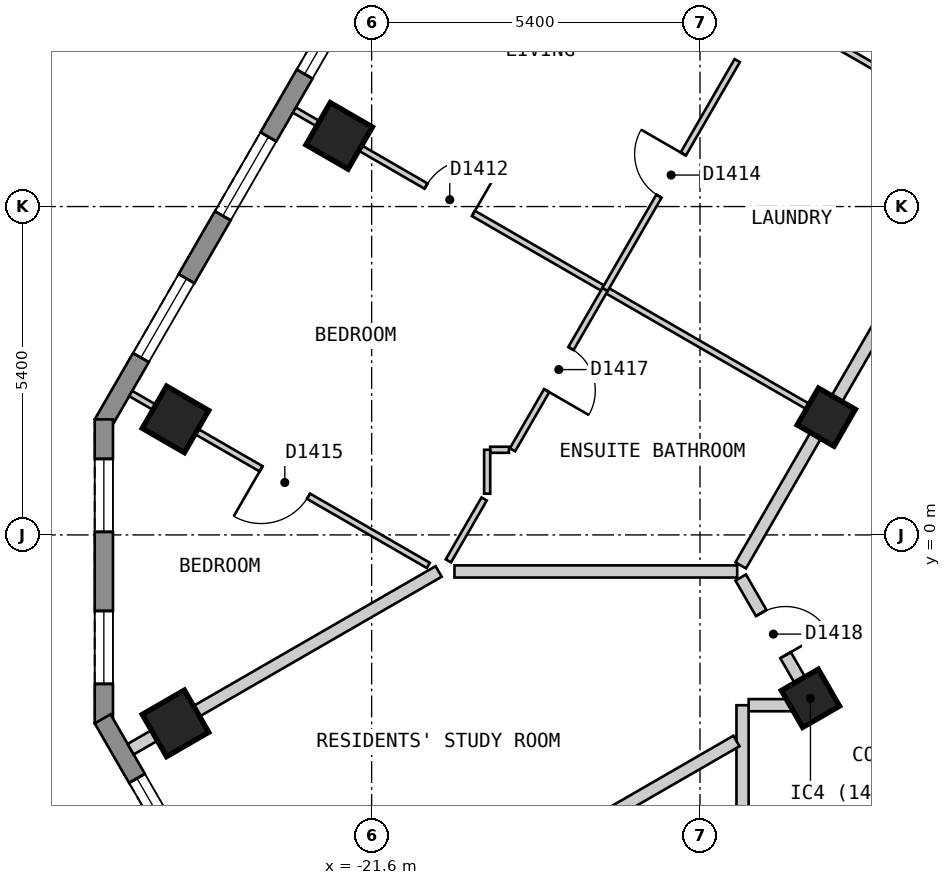
"""IFC4 building model, lengths in metres.
Left out: names, types, materials, properties, quantities, classifications, styles, units other than length and angle.
Written with IfcOpenShell. Run it as: python <this file> out.ifc"""

import sys

from ifc_helpers import new_model, si_unit, direction, frame, frame_2d, origin, origin_2d, place, context, subcontext, project, spatial, polyline, rectangle, outline, extrude, element, fill, save


model = new_model("IFC4")
c1 = context("Model", 3, precision=1e-05, world=origin(), true_north=direction((0.0, 1.0)))
c2 = subcontext(c1, "Body", "Model", "MODEL_VIEW")
j1 = project(units=[si_unit("LENGTHUNIT", "METRE"), si_unit("PLANEANGLEUNIT", "RADIAN")], contexts=[c1])
p1 = place(None, origin())
s1 = spatial("IfcSite", under=j1, at=p1, CompositionType="ELEMENT")
p2 = place(p1, origin())
s2 = spatial("IfcBuilding", under=s1, at=p2, CompositionType="ELEMENT")
p3 = place(p2, frame((0.0, 0.0, 172.2)))
s3 = spatial("IfcBuildingStorey", under=s2, at=p3, CompositionType="ELEMENT", Elevation=172.2)
for number, where, z_axis, x_axis in (
    (1, (-22.134, 6.562, 0.0), (0.0, 0.0, 1.0), (-0.5, -0.866, 0.0)),
    (2, (-24.826, 1.9, 0.0), (0.0, 0.0, 1.0), (-0.5, -0.866, 0.0)),
    (3, (-24.826, -3.099, 0.0), (0.0, 0.0, 1.0), (0.5, -0.866, 0.0)),
):
    element("IfcColumn", number, at=place(p3, frame(where, z_axis=z_axis, x_axis=x_axis)), inside=s3, PredefinedType="COLUMN", context=c2, shape_type="SweptSolid", body=[
        extrude(rectangle(XDim=0.8, YDim=0.8, at=origin_2d()), origin(), (0.0, 0.0, 1.0), 3.0),
    ])
for number, where, z_axis, x_axis in (
    (4, (-14.383, -2.687, 0.0), (0.0, 0.0, 1.0), (0.5, -0.866, 0.0)),
    (5, (-14.123, 1.937, 0.0), (0.0, 0.0, 1.0), (-0.5, -0.866, 0.0)),
):
    element("IfcColumn", number, at=place(p3, frame(where, z_axis=z_axis, x_axis=x_axis)), inside=s3, PredefinedType="COLUMN", context=c2, shape_type="SweptSolid", body=[
        extrude(rectangle(XDim=0.7, YDim=0.7, at=origin_2d()), origin(), (0.0, 0.0, 1.0), 3.0),
    ])
p4 = place(p3, frame((-14.592, 21.625, 0.0), z_axis=(0.0, 0.0, 1.0), x_axis=(-0.500010537973, -0.866019319597, 0.0)))
e6 = element("IfcWall", 6, at=p4, inside=s3, PredefinedType="SOLIDWALL", context=c2, shape_type="SweptSolid", body=[
    extrude(outline(polyline([(0.0, -0.15), (22.863, -0.15), (22.783, 0.15), (0.08, 0.15), (0.0, -0.15)])), origin(), (0.0, 0.0, 1.0), 2.7),
])
p5 = place(p4, frame((1.259, 0.0, 0.15)))
e7 = element("IfcOpeningElement", 7, at=p5, cuts=e6, PredefinedType="OPENING", context=c2, shape_type="SweptSolid", body=[
    extrude(rectangle(XDim=1.5, YDim=2.1, at=frame_2d((0.75, 1.05))), frame((0.0, 0.16, 0.0), z_axis=(0.0, -1.0, 0.0), x_axis=(1.0, 0.0, 0.0)), (0.0, 0.0, 1.0), 0.32),
])
p6 = place(p4, frame((3.952, 0.0, 0.15)))
e8 = element("IfcOpeningElement", 8, at=p6, cuts=e6, PredefinedType="OPENING", context=c2, shape_type="SweptSolid", body=[
    extrude(rectangle(XDim=1.5, YDim=2.1, at=frame_2d((0.75, 1.05))), frame((0.0, 0.16, 0.0), z_axis=(0.0, -1.0, 0.0), x_axis=(1.0, 0.0, 0.0)), (0.0, 0.0, 1.0), 0.32),
])
p7 = place(p4, frame((6.644, 0.0, 0.15)))
e9 = element("IfcOpeningElement", 9, at=p7, cuts=e6, PredefinedType="OPENING", context=c2, shape_type="SweptSolid", body=[
    extrude(rectangle(XDim=1.5, YDim=2.1, at=frame_2d((0.75, 1.05))), frame((0.0, 0.16, 0.0), z_axis=(0.0, -1.0, 0.0), x_axis=(1.0, 0.0, 0.0)), (0.0, 0.0, 1.0), 0.32),
])
p8 = place(p4, frame((9.335, 0.0, 0.15)))
e10 = element("IfcOpeningElement", 10, at=p8, cuts=e6, PredefinedType="OPENING", context=c2, shape_type="SweptSolid", body=[
    extrude(rectangle(XDim=1.5, YDim=2.1, at=frame_2d((0.75, 1.05))), frame((0.0, 0.16, 0.0), z_axis=(0.0, -1.0, 0.0), x_axis=(1.0, 0.0, 0.0)), (0.0, 0.0, 1.0), 0.32),
])
p9 = place(p4, frame((12.028, 0.0, 0.15)))
e11 = element("IfcOpeningElement", 11, at=p9, cuts=e6, PredefinedType="OPENING", context=c2, shape_type="SweptSolid", body=[
    extrude(rectangle(XDim=1.5, YDim=2.1, at=frame_2d((0.75, 1.05))), frame((0.0, 0.16, 0.0), z_axis=(0.0, -1.0, 0.0), x_axis=(1.0, 0.0, 0.0)), (0.0, 0.0, 1.0), 0.32),
])
p10 = place(p4, frame((14.72, 0.0, 0.15)))
e12 = element("IfcOpeningElement", 12, at=p10, cuts=e6, PredefinedType="OPENING", context=c2, shape_type="SweptSolid", body=[
    extrude(rectangle(XDim=1.5, YDim=2.1, at=frame_2d((0.75, 1.05))), frame((0.0, 0.16, 0.0), z_axis=(0.0, -1.0, 0.0), x_axis=(1.0, 0.0, 0.0)), (0.0, 0.0, 1.0), 0.32),
])
p11 = place(p4, frame((17.411, 0.0, 0.15)))
e13 = element("IfcOpeningElement", 13, at=p11, cuts=e6, PredefinedType="OPENING", context=c2, shape_type="SweptSolid", body=[
    extrude(rectangle(XDim=1.5, YDim=2.1, at=frame_2d((0.75, 1.05))), frame((0.0, 0.16, 0.0), z_axis=(0.0, -1.0, 0.0), x_axis=(1.0, 0.0, 0.0)), (0.0, 0.0, 1.0), 0.32),
])
p12 = place(p4, frame((20.104, 0.0, 0.15)))
e14 = element("IfcOpeningElement", 14, at=p12, cuts=e6, PredefinedType="OPENING", context=c2, shape_type="SweptSolid", body=[
    extrude(rectangle(XDim=1.5, YDim=2.1, at=frame_2d((0.75, 1.05))), frame((0.0, 0.16, 0.0), z_axis=(0.0, -1.0, 0.0), x_axis=(1.0, 0.0, 0.0)), (0.0, 0.0, 1.0), 0.32),
])
p13 = place(p3, frame((-26.004, 1.9, 0.0), z_axis=(0.0, 0.0, 1.0), x_axis=(0.0, -1.0, 0.0)))
e15 = element("IfcWall", 15, at=p13, inside=s3, PredefinedType="SOLIDWALL", context=c2, shape_type="SweptSolid", body=[
    extrude(outline(polyline([(0.0, -0.15), (5.0, -0.15), (4.92, 0.15), (0.08, 0.15), (0.0, -0.15)])), origin(), (0.0, 0.0, 1.0), 2.7),
])
p14 = place(p13, frame((0.65, 0.0, 0.15)))
e16 = element("IfcOpeningElement", 16, at=p14, cuts=e15, PredefinedType="OPENING", context=c2, shape_type="SweptSolid", body=[
    extrude(rectangle(XDim=1.2, YDim=2.1, at=frame_2d((0.6, 1.05))), frame((0.0, 0.16, 0.0), z_axis=(0.0, -1.0, 0.0), x_axis=(1.0, 0.0, 0.0)), (0.0, 0.0, 1.0), 0.32),
])
p15 = place(p13, frame((3.15, 0.0, 0.15)))
e17 = element("IfcOpeningElement", 17, at=p15, cuts=e15, PredefinedType="OPENING", context=c2, shape_type="SweptSolid", body=[
    extrude(rectangle(XDim=1.2, YDim=2.1, at=frame_2d((0.6, 1.05))), frame((0.0, 0.16, 0.0), z_axis=(0.0, -1.0, 0.0), x_axis=(1.0, 0.0, 0.0)), (0.0, 0.0, 1.0), 0.32),
])
p16 = place(p3, frame((-26.024, -3.025, 0.0), z_axis=(0.0, 0.0, 1.0), x_axis=(0.500018670445, -0.86601462413, 0.0)))
e18 = element("IfcWall", 18, at=p16, inside=s3, PredefinedType="SOLIDWALL", context=c2, shape_type="SweptSolid", body=[
    extrude(outline(polyline([(0.0, -0.15), (20.785, -0.15), (20.705, 0.15), (0.08, 0.15), (0.0, -0.15)])), origin(), (0.0, 0.0, 1.0), 2.7),
])
p17 = place(p16, frame((1.13, 0.0, 0.15)))
e19 = element("IfcOpeningElement", 19, at=p17, cuts=e18, PredefinedType="OPENING", context=c2, shape_type="SweptSolid", body=[
    extrude(rectangle(XDim=1.5, YDim=2.1, at=frame_2d((0.75, 1.05))), frame((0.0, 0.16, 0.0), z_axis=(0.0, -1.0, 0.0), x_axis=(1.0, 0.0, 0.0)), (0.0, 0.0, 1.0), 0.32),
])
p18 = place(p16, frame((3.562, 0.0, 0.15)))
e20 = element("IfcOpeningElement", 20, at=p18, cuts=e18, PredefinedType="OPENING", context=c2, shape_type="SweptSolid", body=[
    extrude(rectangle(XDim=1.5, YDim=2.1, at=frame_2d((0.75, 1.05))), frame((0.0, 0.16, 0.0), z_axis=(0.0, -1.0, 0.0), x_axis=(1.0, 0.0, 0.0)), (0.0, 0.0, 1.0), 0.32),
])
p19 = place(p16, frame((5.994, 0.0, 0.15)))
e21 = element("IfcOpeningElement", 21, at=p19, cuts=e18, PredefinedType="OPENING", context=c2, shape_type="SweptSolid", body=[
    extrude(rectangle(XDim=1.5, YDim=2.1, at=frame_2d((0.75, 1.05))), frame((0.0, 0.16, 0.0), z_axis=(0.0, -1.0, 0.0), x_axis=(1.0, 0.0, 0.0)), (0.0, 0.0, 1.0), 0.32),
])
p20 = place(p16, frame((8.425, 0.0, 0.15)))
e22 = element("IfcOpeningElement", 22, at=p20, cuts=e18, PredefinedType="OPENING", context=c2, shape_type="SweptSolid", body=[
    extrude(rectangle(XDim=1.5, YDim=2.1, at=frame_2d((0.75, 1.05))), frame((0.0, 0.16, 0.0), z_axis=(0.0, -1.0, 0.0), x_axis=(1.0, 0.0, 0.0)), (0.0, 0.0, 1.0), 0.32),
])
p21 = place(p16, frame((10.857, 0.0, 0.15)))
e23 = element("IfcOpeningElement", 23, at=p21, cuts=e18, PredefinedType="OPENING", context=c2, shape_type="SweptSolid", body=[
    extrude(rectangle(XDim=1.5, YDim=2.1, at=frame_2d((0.75, 1.05))), frame((0.0, 0.16, 0.0), z_axis=(0.0, -1.0, 0.0), x_axis=(1.0, 0.0, 0.0)), (0.0, 0.0, 1.0), 0.32),
])
p22 = place(p16, frame((13.289, 0.0, 0.15)))
e24 = element("IfcOpeningElement", 24, at=p22, cuts=e18, PredefinedType="OPENING", context=c2, shape_type="SweptSolid", body=[
    extrude(rectangle(XDim=1.5, YDim=2.1, at=frame_2d((0.75, 1.05))), frame((0.0, 0.16, 0.0), z_axis=(0.0, -1.0, 0.0), x_axis=(1.0, 0.0, 0.0)), (0.0, 0.0, 1.0), 0.32),
])
p23 = place(p16, frame((15.722, 0.0, 0.15)))
e25 = element("IfcOpeningElement", 25, at=p23, cuts=e18, PredefinedType="OPENING", context=c2, shape_type="SweptSolid", body=[
    extrude(rectangle(XDim=1.5, YDim=2.1, at=frame_2d((0.75, 1.05))), frame((0.0, 0.16, 0.0), z_axis=(0.0, -1.0, 0.0), x_axis=(1.0, 0.0, 0.0)), (0.0, 0.0, 1.0), 0.32),
])
p24 = place(p16, frame((18.154, 0.0, 0.15)))
e26 = element("IfcOpeningElement", 26, at=p24, cuts=e18, PredefinedType="OPENING", context=c2, shape_type="SweptSolid", body=[
    extrude(rectangle(XDim=1.5, YDim=2.1, at=frame_2d((0.75, 1.05))), frame((0.0, 0.16, 0.0), z_axis=(0.0, -1.0, 0.0), x_axis=(1.0, 0.0, 0.0)), (0.0, 0.0, 1.0), 0.32),
])
p25 = place(p3, frame((-15.53, -0.701, 0.0), z_axis=(0.0, 0.0, 1.0), x_axis=(0.499972710878, -0.866041158593, 0.0)))
e27 = element("IfcWall", 27, at=p25, inside=s3, PredefinedType="PARTITIONING", context=c2, shape_type="SweptSolid", body=[
    extrude(rectangle(XDim=2.308, YDim=0.2, at=frame_2d((1.154, 0.0))), origin(), (0.0, 0.0, 1.0), 2.7),
])
p26 = place(p25, frame((0.674, 0.0, 0.0)))
e28 = element("IfcOpeningElement", 28, at=p26, cuts=e27, PredefinedType="OPENING", context=c2, shape_type="SweptSolid", body=[
    extrude(rectangle(XDim=0.8, YDim=2.1, at=frame_2d((0.4, 1.05))), frame((0.0, 0.11, 0.0), z_axis=(0.0, -1.0, 0.0), x_axis=(1.0, 0.0, 0.0)), (0.0, 0.0, 1.0), 0.22),
])
p27 = place(p3, frame((-15.399, -2.8, 0.0), z_axis=(0.0, 0.0, 1.0), x_axis=(1.0, 0.0, 0.0)))
e29 = element("IfcWall", 29, at=p27, inside=s3, PredefinedType="PARTITIONING", context=c2, shape_type="SweptSolid", body=[
    extrude(rectangle(XDim=1.081, YDim=0.2, at=frame_2d((0.541, 0.0))), origin(), (0.0, 0.0, 1.0), 2.7),
])
p28 = place(p3, frame((-15.53, -0.501, 0.0), z_axis=(0.0, 0.0, 1.0), x_axis=(0.499952498232, 0.866052827206, 0.0)))
e30 = element("IfcWall", 30, at=p28, inside=s3, PredefinedType="PARTITIONING", context=c2, shape_type="SweptSolid", body=[
    extrude(rectangle(XDim=9.585, YDim=0.2, at=frame_2d((4.792, 0.0))), origin(), (0.0, 0.0, 1.0), 2.7),
])
p29 = place(p3, frame((-15.5, -6.6, 0.0), z_axis=(0.0, 0.0, 1.0), x_axis=(0.0, 1.0, 0.0)))
e31 = element("IfcWall", 31, at=p29, inside=s3, PredefinedType="PARTITIONING", context=c2, shape_type="SweptSolid", body=[
    extrude(rectangle(XDim=3.799, YDim=0.2, at=frame_2d((1.899, 0.0))), origin(), (0.0, 0.0, 1.0), 2.7),
])
p30 = place(p3, frame((-22.87, 6.987, 0.0), z_axis=(0.0, 0.0, 1.0), x_axis=(0.866022959057, -0.500004234368, 0.0)))
e32 = element("IfcWall", 32, at=p30, inside=s3, PredefinedType="PARTITIONING", context=c2, shape_type="SweptSolid", body=[
    extrude(rectangle(XDim=10.0, YDim=0.1, at=frame_2d((5.0, 0.0))), origin(), (0.0, 0.0, 1.0), 2.7),
])
p31 = place(p30, frame((2.5, 0.0, 0.0)))
e33 = element("IfcOpeningElement", 33, at=p31, cuts=e32, PredefinedType="OPENING", context=c2, shape_type="SweptSolid", body=[
    extrude(rectangle(XDim=0.9, YDim=2.1, at=frame_2d((0.45, 1.05))), frame((0.0, 0.06, 0.0), z_axis=(0.0, -1.0, 0.0), x_axis=(1.0, 0.0, 0.0)), (0.0, 0.0, 1.0), 0.12),
])
p32 = place(p3, frame((-25.562, 2.325, 0.0), z_axis=(0.0, 0.0, 1.0), x_axis=(0.865998530728, -0.500046542611, 0.0)))
e34 = element("IfcWall", 34, at=p32, inside=s3, PredefinedType="PARTITIONING", context=c2, shape_type="SweptSolid", body=[
    extrude(rectangle(XDim=5.651, YDim=0.1, at=frame_2d((2.826, 0.0))), origin(), (0.0, 0.0, 1.0), 2.7),
])
p33 = place(p32, frame((2.476, 0.0, 0.0)))
e35 = element("IfcOpeningElement", 35, at=p33, cuts=e34, PredefinedType="OPENING", context=c2, shape_type="SweptSolid", body=[
    extrude(rectangle(XDim=0.9, YDim=2.1, at=frame_2d((0.45, 1.05))), frame((0.0, 0.06, 0.0), z_axis=(0.0, -1.0, 0.0), x_axis=(1.0, 0.0, 0.0)), (0.0, 0.0, 1.0), 0.12),
])
p34 = place(p3, frame((-15.199, 8.775, 0.0), z_axis=(0.0, 0.0, 1.0), x_axis=(0.866043063166, -0.499969411806, 0.0)))
e36 = element("IfcWall", 36, at=p34, inside=s3, PredefinedType="PARTITIONING", context=c2, shape_type="SweptSolid", body=[
    extrude(rectangle(XDim=4.25, YDim=0.1, at=frame_2d((2.125, 0.0))), origin(), (0.0, 0.0, 1.0), 2.7),
])
p35 = place(p3, frame((-19.65, 1.4, 0.0), z_axis=(0.0, 0.0, 1.0), x_axis=(1.0, 0.0, 0.0)))
e37 = element("IfcWall", 37, at=p35, inside=s3, PredefinedType="PARTITIONING", context=c2, shape_type="SweptSolid", body=[
    extrude(rectangle(XDim=0.309, YDim=0.1, at=frame_2d((0.154, 0.0))), origin(), (0.0, 0.0, 1.0), 2.7),
])
p36 = place(p3, frame((-20.338, -0.427, 0.0), z_axis=(0.0, 0.0, 1.0), x_axis=(0.500069990121, 0.865984991198, 0.0)))
e38 = element("IfcWall", 38, at=p36, inside=s3, PredefinedType="PARTITIONING", context=c2, shape_type="SweptSolid", body=[
    extrude(rectangle(XDim=1.176, YDim=0.1, at=frame_2d((0.588, 0.0))), origin(), (0.0, 0.0, 1.0), 2.7),
])
p37 = place(p3, frame((-19.283, 1.4, 0.0), z_axis=(0.0, 0.0, 1.0), x_axis=(0.499847391584, 0.866113494368, 0.0)))
e39 = element("IfcWall", 39, at=p37, inside=s3, PredefinedType="PARTITIONING", context=c2, shape_type="SweptSolid", body=[
    extrude(rectangle(XDim=3.045, YDim=0.1, at=frame_2d((1.522, 0.0))), origin(), (0.0, 0.0, 1.0), 2.7),
])
p38 = place(p37, frame((1.123, 0.0, 0.0)))
e40 = element("IfcOpeningElement", 40, at=p38, cuts=e39, PredefinedType="OPENING", context=c2, shape_type="SweptSolid", body=[
    extrude(rectangle(XDim=0.8, YDim=2.1, at=frame_2d((0.4, 1.05))), frame((0.0, 0.06, 0.0), z_axis=(0.0, -1.0, 0.0), x_axis=(1.0, 0.0, 0.0)), (0.0, 0.0, 1.0), 0.12),
])
p39 = place(p3, frame((-19.7, 0.678, 0.0), z_axis=(0.0, 0.0, 1.0), x_axis=(0.0, 1.0, 0.0)))
e41 = element("IfcWall", 41, at=p39, inside=s3, PredefinedType="PARTITIONING", context=c2, shape_type="SweptSolid", body=[
    extrude(rectangle(XDim=0.722, YDim=0.1, at=frame_2d((0.361, 0.0))), origin(), (0.0, 0.0, 1.0), 2.7),
])
p40 = place(p3, frame((-20.238, -0.601, 0.0), z_axis=(0.0, 0.0, 1.0), x_axis=(1.0, 0.0, 0.0)))
e42 = element("IfcWall", 42, at=p40, inside=s3, PredefinedType="PARTITIONING", context=c2, shape_type="SweptSolid", body=[
    extrude(rectangle(XDim=4.65, YDim=0.2, at=frame_2d((2.325, 0.0))), origin(), (0.0, 0.0, 1.0), 2.7),
])
p41 = place(p3, frame((-23.13, -7.737, 0.0), z_axis=(0.0, 0.0, 1.0), x_axis=(0.86598451299, 0.500070818246, 0.0)))
e43 = element("IfcWall", 43, at=p41, inside=s3, PredefinedType="PARTITIONING", context=c2, shape_type="SweptSolid", body=[
    extrude(rectangle(XDim=8.695, YDim=0.2, at=frame_2d((4.348, 0.0))), origin(), (0.0, 0.0, 1.0), 2.7),
])
p42 = place(p3, frame((-25.563, -3.524, 0.0), z_axis=(0.0, 0.0, 1.0), x_axis=(0.866128586522, 0.499821239653, 0.0)))
e44 = element("IfcWall", 44, at=p42, inside=s3, PredefinedType="PARTITIONING", context=c2, shape_type="SweptSolid", body=[
    extrude(rectangle(XDim=5.848, YDim=0.2, at=frame_2d((2.924, 0.0))), origin(), (0.0, 0.0, 1.0), 2.7),
])
p43 = place(p3, frame((-17.761, 4.037, 0.0), z_axis=(0.0, 0.0, 1.0), x_axis=(0.50009692756, 0.865969435399, 0.0)))
e45 = element("IfcWall", 45, at=p43, inside=s3, PredefinedType="PARTITIONING", context=c2, shape_type="SweptSolid", body=[
    extrude(rectangle(XDim=4.345, YDim=0.1, at=frame_2d((2.173, 0.0))), origin(), (0.0, 0.0, 1.0), 2.7),
])
p44 = place(p43, frame((1.772, 0.0, 0.0)))
e46 = element("IfcOpeningElement", 46, at=p44, cuts=e45, PredefinedType="OPENING", context=c2, shape_type="SweptSolid", body=[
    extrude(rectangle(XDim=0.8, YDim=2.1, at=frame_2d((0.4, 1.05))), frame((0.0, 0.06, 0.0), z_axis=(0.0, -1.0, 0.0), x_axis=(1.0, 0.0, 0.0)), (0.0, 0.0, 1.0), 0.12),
])
p45 = place(p10, origin())
e47 = element("IfcWindow", 47, at=p45, inside=s3, PartitioningType="SINGLE_PANEL", PredefinedType="WINDOW", context=c2, shape_type="SweptSolid", body=[
    extrude(rectangle(XDim=1.5, YDim=2.1, at=frame_2d((0.75, 1.05))), frame((0.0, 0.03, 0.0), z_axis=(0.0, -1.0, 0.0), x_axis=(1.0, 0.0, 0.0)), (0.0, 0.0, 1.0), 0.06),
])
fill(e12, e47)
p46 = place(p11, origin())
e48 = element("IfcWindow", 48, at=p46, inside=s3, PartitioningType="SINGLE_PANEL", PredefinedType="WINDOW", context=c2, shape_type="SweptSolid", body=[
    extrude(rectangle(XDim=1.5, YDim=2.1, at=frame_2d((0.75, 1.05))), frame((0.0, 0.03, 0.0), z_axis=(0.0, -1.0, 0.0), x_axis=(1.0, 0.0, 0.0)), (0.0, 0.0, 1.0), 0.06),
])
fill(e13, e48)
p47 = place(p12, origin())
e49 = element("IfcWindow", 49, at=p47, inside=s3, PartitioningType="SINGLE_PANEL", PredefinedType="WINDOW", context=c2, shape_type="SweptSolid", body=[
    extrude(rectangle(XDim=1.5, YDim=2.1, at=frame_2d((0.75, 1.05))), frame((0.0, 0.03, 0.0), z_axis=(0.0, -1.0, 0.0), x_axis=(1.0, 0.0, 0.0)), (0.0, 0.0, 1.0), 0.06),
])
fill(e14, e49)
p48 = place(p14, origin())
e50 = element("IfcWindow", 50, at=p48, inside=s3, PartitioningType="SINGLE_PANEL", PredefinedType="WINDOW", context=c2, shape_type="SweptSolid", body=[
    extrude(rectangle(XDim=1.2, YDim=2.1, at=frame_2d((0.6, 1.05))), frame((0.0, 0.03, 0.0), z_axis=(0.0, -1.0, 0.0), x_axis=(1.0, 0.0, 0.0)), (0.0, 0.0, 1.0), 0.06),
])
fill(e16, e50)
p49 = place(p15, origin())
e51 = element("IfcWindow", 51, at=p49, inside=s3, PartitioningType="SINGLE_PANEL", PredefinedType="WINDOW", context=c2, shape_type="SweptSolid", body=[
    extrude(rectangle(XDim=1.2, YDim=2.1, at=frame_2d((0.6, 1.05))), frame((0.0, 0.03, 0.0), z_axis=(0.0, -1.0, 0.0), x_axis=(1.0, 0.0, 0.0)), (0.0, 0.0, 1.0), 0.06),
])
fill(e17, e51)
p50 = place(p17, origin())
e52 = element("IfcWindow", 52, at=p50, inside=s3, PartitioningType="SINGLE_PANEL", PredefinedType="WINDOW", context=c2, shape_type="SweptSolid", body=[
    extrude(rectangle(XDim=1.5, YDim=2.1, at=frame_2d((0.75, 1.05))), frame((0.0, 0.03, 0.0), z_axis=(0.0, -1.0, 0.0), x_axis=(1.0, 0.0, 0.0)), (0.0, 0.0, 1.0), 0.06),
])
fill(e19, e52)
p51 = place(p31, origin())
e53 = element("IfcDoor", 53, at=p51, inside=s3, OperationType="SINGLE_SWING_RIGHT", PredefinedType="DOOR", context=c2, shape_type="SweptSolid", body=[
    extrude(rectangle(XDim=0.9, YDim=2.1, at=frame_2d((0.45, 1.05))), frame((0.0, 0.025, 0.0), z_axis=(0.0, -1.0, 0.0), x_axis=(1.0, 0.0, 0.0)), (0.0, 0.0, 1.0), 0.05),
])
fill(e33, e53)
p52 = place(p44, origin())
e54 = element("IfcDoor", 54, at=p52, inside=s3, OperationType="SINGLE_SWING_RIGHT", PredefinedType="DOOR", context=c2, shape_type="SweptSolid", body=[
    extrude(rectangle(XDim=0.8, YDim=2.1, at=frame_2d((0.4, 1.05))), frame((0.0, 0.025, 0.0), z_axis=(0.0, -1.0, 0.0), x_axis=(1.0, 0.0, 0.0)), (0.0, 0.0, 1.0), 0.05),
])
fill(e46, e54)
p53 = place(p33, origin())
e55 = element("IfcDoor", 55, at=p53, inside=s3, OperationType="SINGLE_SWING_LEFT", PredefinedType="DOOR", context=c2, shape_type="SweptSolid", body=[
    extrude(rectangle(XDim=0.9, YDim=2.1, at=frame_2d((0.45, 1.05))), frame((0.0, 0.025, 0.0), z_axis=(0.0, -1.0, 0.0), x_axis=(1.0, 0.0, 0.0)), (0.0, 0.0, 1.0), 0.05),
])
fill(e35, e55)
p54 = place(p38, origin())
e56 = element("IfcDoor", 56, at=p54, inside=s3, OperationType="SINGLE_SWING_LEFT", PredefinedType="DOOR", context=c2, shape_type="SweptSolid", body=[
    extrude(rectangle(XDim=0.8, YDim=2.1, at=frame_2d((0.4, 1.05))), frame((0.0, 0.025, 0.0), z_axis=(0.0, -1.0, 0.0), x_axis=(1.0, 0.0, 0.0)), (0.0, 0.0, 1.0), 0.05),
])
fill(e40, e56)
p55 = place(p26, origin())
e57 = element("IfcDoor", 57, at=p55, inside=s3, OperationType="SINGLE_SWING_RIGHT", PredefinedType="DOOR", context=c2, shape_type="SweptSolid", body=[
    extrude(rectangle(XDim=0.8, YDim=2.1, at=frame_2d((0.4, 1.05))), frame((0.0, 0.025, 0.0), z_axis=(0.0, -1.0, 0.0), x_axis=(1.0, 0.0, 0.0)), (0.0, 0.0, 1.0), 0.05),
])
fill(e28, e57)
save(model, sys.argv[1])
